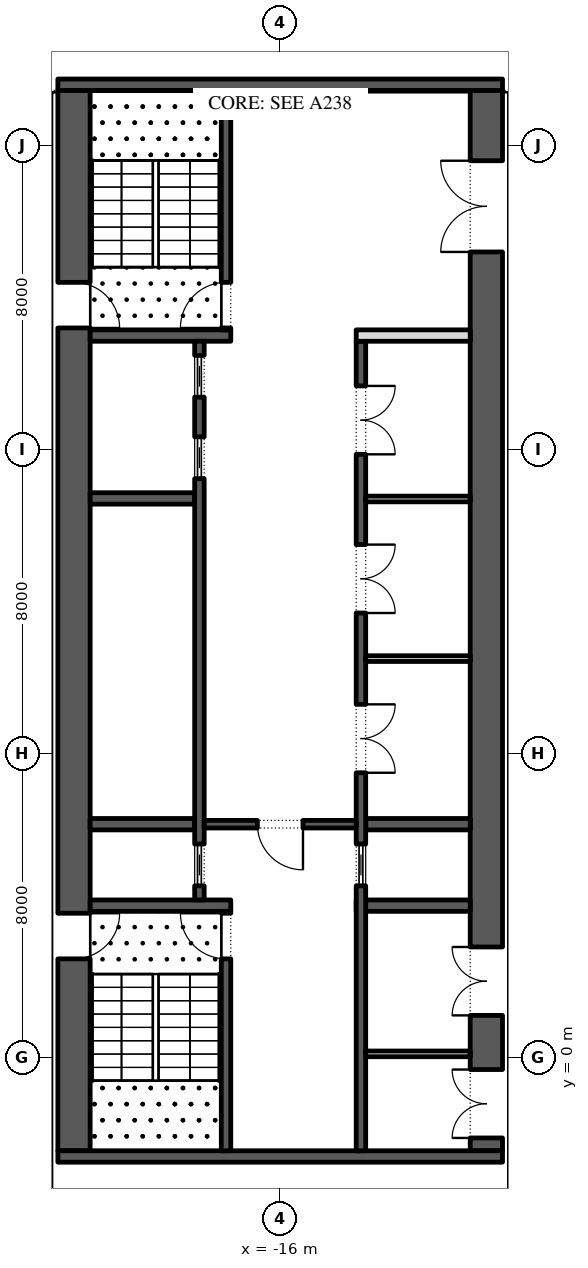
"""IFC4 building model, lengths in metres.
Left out: names, types, materials, properties, quantities, classifications, styles, units other than length and angle.
Written with IfcOpenShell. Run it as: python <this file> out.ifc"""

import sys

from ifc_helpers import new_model, si_unit, direction, frame, frame_2d, origin, place, context, subcontext, project, spatial, rectangle, extrude, element, fill, save


model = new_model("IFC4")
c1 = context("Model", 3, precision=1e-05, world=origin(), true_north=direction((0.0, 1.0)))
c2 = subcontext(c1, "Body", "Model", "MODEL_VIEW")
j1 = project(units=[si_unit("LENGTHUNIT", "METRE"), si_unit("PLANEANGLEUNIT", "RADIAN")], contexts=[c1])
p1 = place(None, origin())
s1 = spatial("IfcSite", under=j1, at=p1, CompositionType="ELEMENT")
p2 = place(p1, origin())
s2 = spatial("IfcBuilding", under=s1, at=p2, CompositionType="ELEMENT")
p3 = place(p2, frame((0.0, 0.0, 160.2)))
s3 = spatial("IfcBuildingStorey", under=s2, at=p3, CompositionType="ELEMENT", Elevation=160.2)
p4 = place(p3, frame((-21.425, -2.45, 0.0), z_axis=(0.0, 0.0, 1.0), x_axis=(0.0, 1.0, 0.0)))
e1 = element("IfcWall", 1, at=p4, inside=s3, PredefinedType="SHEAR", context=c2, shape_type="SweptSolid", body=[
    extrude(rectangle(XDim=27.9, YDim=0.85, at=frame_2d((13.95, 0.0))), origin(), (0.0, 0.0, 1.0), 4.95),
])
p5 = place(p4, frame((5.05, 0.0, 0.0)))
e2 = element("IfcOpeningElement", 2, at=p5, cuts=e1, PredefinedType="OPENING", context=c2, shape_type="SweptSolid", body=[
    extrude(rectangle(XDim=1.2, YDim=2.1, at=frame_2d((0.6, 1.05))), frame((0.0, 0.435, 0.0), z_axis=(0.0, -1.0, 0.0), x_axis=(1.0, 0.0, 0.0)), (0.0, 0.0, 1.0), 0.87),
])
p6 = place(p4, frame((21.65, 0.0, 0.0)))
e3 = element("IfcOpeningElement", 3, at=p6, cuts=e1, PredefinedType="OPENING", context=c2, shape_type="SweptSolid", body=[
    extrude(rectangle(XDim=1.2, YDim=2.1, at=frame_2d((0.6, 1.05))), frame((0.0, 0.435, 0.0), z_axis=(0.0, -1.0, 0.0), x_axis=(1.0, 0.0, 0.0)), (0.0, 0.0, 1.0), 0.87),
])
p7 = place(p3, frame((-10.575, -2.45, 0.0), z_axis=(0.0, 0.0, 1.0), x_axis=(0.0, 1.0, 0.0)))
e4 = element("IfcWall", 4, at=p7, inside=s3, PredefinedType="SHEAR", context=c2, shape_type="SweptSolid", body=[
    extrude(rectangle(XDim=27.9, YDim=0.85, at=frame_2d((13.95, 0.0))), origin(), (0.0, 0.0, 1.0), 4.95),
])
p8 = place(p7, frame((23.65, 0.0, 0.0)))
e5 = element("IfcOpeningElement", 5, at=p8, cuts=e4, PredefinedType="OPENING", context=c2, shape_type="SweptSolid", body=[
    extrude(rectangle(XDim=2.4, YDim=2.1, at=frame_2d((1.2, 1.05))), frame((0.0, 0.435, 0.0), z_axis=(0.0, -1.0, 0.0), x_axis=(1.0, 0.0, 0.0)), (0.0, 0.0, 1.0), 0.87),
])
p9 = place(p7, frame((0.337, 0.0, 0.0)))
e6 = element("IfcOpeningElement", 6, at=p9, cuts=e4, PredefinedType="OPENING", context=c2, shape_type="SweptSolid", body=[
    extrude(rectangle(XDim=1.8, YDim=2.4, at=frame_2d((0.9, 1.2))), frame((0.0, 0.435, 0.0), z_axis=(0.0, -1.0, 0.0), x_axis=(1.0, 0.0, 0.0)), (0.0, 0.0, 1.0), 0.87),
])
p10 = place(p7, frame((3.562, 0.0, 0.0)))
e7 = element("IfcOpeningElement", 7, at=p10, cuts=e4, PredefinedType="OPENING", context=c2, shape_type="SweptSolid", body=[
    extrude(rectangle(XDim=1.8, YDim=2.4, at=frame_2d((0.9, 1.2))), frame((0.0, 0.435, 0.0), z_axis=(0.0, -1.0, 0.0), x_axis=(1.0, 0.0, 0.0)), (0.0, 0.0, 1.0), 0.87),
])
for number, where, z_axis, x_axis in (
    (8, (-21.85, -2.6, 0.0), (0.0, 0.0, 1.0), (1.0, 0.0, 0.0)),
    (9, (-21.85, 25.6, 0.0), (0.0, 0.0, 1.0), (1.0, 0.0, 0.0)),
):
    element("IfcWall", number, at=place(p3, frame(where, z_axis=z_axis, x_axis=x_axis)), inside=s3, PredefinedType="SHEAR", context=c2, shape_type="SweptSolid", body=[
        extrude(rectangle(XDim=11.7, YDim=0.3, at=frame_2d((5.85, 0.0))), origin(), (0.0, 0.0, 1.0), 4.95),
    ])
p11 = place(p3, frame((-21.0, 4.0, 0.0), z_axis=(0.0, 0.0, 1.0), x_axis=(1.0, 0.0, 0.0)))
e10 = element("IfcWall", 10, at=p11, inside=s3, PredefinedType="SHEAR", context=c2, shape_type="SweptSolid", body=[
    extrude(rectangle(XDim=3.7, YDim=0.3, at=frame_2d((1.85, 0.0))), origin(), (0.0, 0.0, 1.0), 4.95),
])
p12 = place(p3, frame((-17.425, -2.45, 0.0), z_axis=(0.0, 0.0, 1.0), x_axis=(0.0, 1.0, 0.0)))
e11 = element("IfcWall", 11, at=p12, inside=s3, PredefinedType="SHEAR", context=c2, shape_type="SweptSolid", body=[
    extrude(rectangle(XDim=6.3, YDim=0.25, at=frame_2d((3.15, 0.0))), origin(), (0.0, 0.0, 1.0), 4.95),
])
p13 = place(p12, frame((5.05, 0.0, 0.0)))
e12 = element("IfcOpeningElement", 12, at=p13, cuts=e11, PredefinedType="OPENING", context=c2, shape_type="SweptSolid", body=[
    extrude(rectangle(XDim=1.2, YDim=2.1, at=frame_2d((0.6, 1.05))), frame((0.0, 0.135, 0.0), z_axis=(0.0, -1.0, 0.0), x_axis=(1.0, 0.0, 0.0)), (0.0, 0.0, 1.0), 0.27),
])
p14 = place(p3, frame((-21.0, 19.0, 0.0), z_axis=(0.0, 0.0, 1.0), x_axis=(1.0, 0.0, 0.0)))
e13 = element("IfcWall", 13, at=p14, inside=s3, PredefinedType="SHEAR", context=c2, shape_type="SweptSolid", body=[
    extrude(rectangle(XDim=3.7, YDim=0.3, at=frame_2d((1.85, 0.0))), origin(), (0.0, 0.0, 1.0), 4.95),
])
p15 = place(p3, frame((-17.425, 19.15, 0.0), z_axis=(0.0, 0.0, 1.0), x_axis=(0.0, 1.0, 0.0)))
e14 = element("IfcWall", 14, at=p15, inside=s3, PredefinedType="SHEAR", context=c2, shape_type="SweptSolid", body=[
    extrude(rectangle(XDim=6.3, YDim=0.25, at=frame_2d((3.15, 0.0))), origin(), (0.0, 0.0, 1.0), 4.95),
])
p16 = place(p15, frame((0.05, 0.0, 0.0)))
e15 = element("IfcOpeningElement", 15, at=p16, cuts=e14, PredefinedType="OPENING", context=c2, shape_type="SweptSolid", body=[
    extrude(rectangle(XDim=1.2, YDim=2.1, at=frame_2d((0.6, 1.05))), frame((0.0, 0.135, 0.0), z_axis=(0.0, -1.0, 0.0), x_axis=(1.0, 0.0, 0.0)), (0.0, 0.0, 1.0), 0.27),
])
for number, where, z_axis, x_axis in (
    (16, (-21.0, 6.143, 0.0), (0.0, 0.0, 1.0), (1.0, 0.0, 0.0)),
    (17, (-21.0, 14.714, 0.0), (0.0, 0.0, 1.0), (1.0, 0.0, 0.0)),
):
    element("IfcWall", number, at=place(p3, frame(where, z_axis=z_axis, x_axis=x_axis)), inside=s3, PredefinedType="SHEAR", context=c2, shape_type="SweptSolid", body=[
        extrude(rectangle(XDim=2.75, YDim=0.3, at=frame_2d((1.375, 0.0))), origin(), (0.0, 0.0, 1.0), 4.95),
    ])
p17 = place(p3, frame((-18.125, 4.15, 0.0), z_axis=(0.0, 0.0, 1.0), x_axis=(0.0, 1.0, 0.0)))
e18 = element("IfcWall", 18, at=p17, inside=s3, PredefinedType="SHEAR", context=c2, shape_type="SweptSolid", body=[
    extrude(rectangle(XDim=14.7, YDim=0.25, at=frame_2d((7.35, 0.0))), origin(), (0.0, 0.0, 1.0), 4.95),
])
p18 = place(p17, frame((0.371, 0.0, 0.0)))
e19 = element("IfcOpeningElement", 19, at=p18, cuts=e18, PredefinedType="OPENING", context=c2, shape_type="SweptSolid", body=[
    extrude(rectangle(XDim=1.1, YDim=2.1, at=frame_2d((0.55, 1.05))), frame((0.0, 0.135, 0.0), z_axis=(0.0, -1.0, 0.0), x_axis=(1.0, 0.0, 0.0)), (0.0, 0.0, 1.0), 0.27),
])
p19 = place(p17, frame((11.086, 0.0, 0.0)))
e20 = element("IfcOpeningElement", 20, at=p19, cuts=e18, PredefinedType="OPENING", context=c2, shape_type="SweptSolid", body=[
    extrude(rectangle(XDim=1.1, YDim=2.1, at=frame_2d((0.55, 1.05))), frame((0.0, 0.135, 0.0), z_axis=(0.0, -1.0, 0.0), x_axis=(1.0, 0.0, 0.0)), (0.0, 0.0, 1.0), 0.27),
])
p20 = place(p17, frame((13.229, 0.0, 0.0)))
e21 = element("IfcOpeningElement", 21, at=p20, cuts=e18, PredefinedType="OPENING", context=c2, shape_type="SweptSolid", body=[
    extrude(rectangle(XDim=1.1, YDim=2.1, at=frame_2d((0.55, 1.05))), frame((0.0, 0.135, 0.0), z_axis=(0.0, -1.0, 0.0), x_axis=(1.0, 0.0, 0.0)), (0.0, 0.0, 1.0), 0.27),
])
p21 = place(p3, frame((-14.0, 4.0, 0.0), z_axis=(0.0, 0.0, 1.0), x_axis=(1.0, 0.0, 0.0)))
e22 = element("IfcWall", 22, at=p21, inside=s3, PredefinedType="SHEAR", context=c2, shape_type="SweptSolid", body=[
    extrude(rectangle(XDim=3.0, YDim=0.3, at=frame_2d((1.5, 0.0))), origin(), (0.0, 0.0, 1.0), 4.95),
])
p22 = place(p3, frame((-13.75, 6.143, 0.0), z_axis=(0.0, 0.0, 1.0), x_axis=(1.0, 0.0, 0.0)))
e23 = element("IfcWall", 23, at=p22, inside=s3, PredefinedType="SHEAR", context=c2, shape_type="SweptSolid", body=[
    extrude(rectangle(XDim=2.75, YDim=0.3, at=frame_2d((1.375, 0.0))), origin(), (0.0, 0.0, 1.0), 4.95),
])
p23 = place(p3, frame((-13.875, -2.45, 0.0), z_axis=(0.0, 0.0, 1.0), x_axis=(0.0, 1.0, 0.0)))
e24 = element("IfcWall", 24, at=p23, inside=s3, PredefinedType="SHEAR", context=c2, shape_type="SweptSolid", body=[
    extrude(rectangle(XDim=21.3, YDim=0.25, at=frame_2d((10.65, 0.0))), origin(), (0.0, 0.0, 1.0), 4.95),
])
p24 = place(p23, frame((9.946, 0.0, 0.0)))
e25 = element("IfcOpeningElement", 25, at=p24, cuts=e24, PredefinedType="OPENING", context=c2, shape_type="SweptSolid", body=[
    extrude(rectangle(XDim=1.8, YDim=2.4, at=frame_2d((0.9, 1.2))), frame((0.0, 0.135, 0.0), z_axis=(0.0, -1.0, 0.0), x_axis=(1.0, 0.0, 0.0)), (0.0, 0.0, 1.0), 0.27),
])
p25 = place(p23, frame((14.15, 0.0, 0.0)))
e26 = element("IfcOpeningElement", 26, at=p25, cuts=e24, PredefinedType="OPENING", context=c2, shape_type="SweptSolid", body=[
    extrude(rectangle(XDim=1.8, YDim=2.4, at=frame_2d((0.9, 1.2))), frame((0.0, 0.135, 0.0), z_axis=(0.0, -1.0, 0.0), x_axis=(1.0, 0.0, 0.0)), (0.0, 0.0, 1.0), 0.27),
])
p26 = place(p23, frame((18.325, 0.0, 0.0)))
e27 = element("IfcOpeningElement", 27, at=p26, cuts=e24, PredefinedType="OPENING", context=c2, shape_type="SweptSolid", body=[
    extrude(rectangle(XDim=1.8, YDim=2.4, at=frame_2d((0.9, 1.2))), frame((0.0, 0.135, 0.0), z_axis=(0.0, -1.0, 0.0), x_axis=(1.0, 0.0, 0.0)), (0.0, 0.0, 1.0), 0.27),
])
p27 = place(p23, frame((6.971, 0.0, 0.0)))
e28 = element("IfcOpeningElement", 28, at=p27, cuts=e24, PredefinedType="OPENING", context=c2, shape_type="SweptSolid", body=[
    extrude(rectangle(XDim=1.1, YDim=2.1, at=frame_2d((0.55, 1.05))), frame((0.0, 0.135, 0.0), z_axis=(0.0, -1.0, 0.0), x_axis=(1.0, 0.0, 0.0)), (0.0, 0.0, 1.0), 0.27),
])
p28 = place(p3, frame((-14.0, 19.0, 0.0), z_axis=(0.0, 0.0, 1.0), x_axis=(1.0, 0.0, 0.0)))
e29 = element("IfcWall", 29, at=p28, inside=s3, PredefinedType="PARTITIONING", context=c2, shape_type="SweptSolid", body=[
    extrude(rectangle(XDim=3.0, YDim=0.3, at=frame_2d((1.5, 0.0))), origin(), (0.0, 0.0, 1.0), 4.95),
])
for number, where, z_axis, x_axis in (
    (30, (-13.75, 10.5, 0.0), (0.0, 0.0, 1.0), (1.0, 0.0, 0.0)),
    (31, (-13.75, 14.7, 0.0), (0.0, 0.0, 1.0), (1.0, 0.0, 0.0)),
):
    element("IfcWall", number, at=place(p3, frame(where, z_axis=z_axis, x_axis=x_axis)), inside=s3, PredefinedType="PARTITIONING", context=c2, shape_type="SweptSolid", body=[
        extrude(rectangle(XDim=2.75, YDim=0.15, at=frame_2d((1.375, 0.0))), origin(), (0.0, 0.0, 1.0), 4.95),
    ])
p29 = place(p3, frame((-18.0, 6.143, 0.0), z_axis=(0.0, 0.0, 1.0), x_axis=(1.0, 0.0, 0.0)))
e32 = element("IfcWall", 32, at=p29, inside=s3, PredefinedType="SHEAR", context=c2, shape_type="SweptSolid", body=[
    extrude(rectangle(XDim=4.0, YDim=0.2, at=frame_2d((2.0, 0.0))), origin(), (0.0, 0.0, 1.0), 4.95),
])
p30 = place(p29, frame((1.4, 0.0, 0.0)))
e33 = element("IfcOpeningElement", 33, at=p30, cuts=e32, PredefinedType="OPENING", context=c2, shape_type="SweptSolid", body=[
    extrude(rectangle(XDim=1.2, YDim=2.1, at=frame_2d((0.6, 1.05))), frame((0.0, 0.11, 0.0), z_axis=(0.0, -1.0, 0.0), x_axis=(1.0, 0.0, 0.0)), (0.0, 0.0, 1.0), 0.22),
])
p31 = place(p3, frame((-13.75, 0.1, 0.0), z_axis=(0.0, 0.0, 1.0), x_axis=(1.0, 0.0, 0.0)))
e34 = element("IfcWall", 34, at=p31, inside=s3, PredefinedType="PARTITIONING", context=c2, shape_type="SweptSolid", body=[
    extrude(rectangle(XDim=2.75, YDim=0.15, at=frame_2d((1.375, 0.0))), origin(), (0.0, 0.0, 1.0), 4.95),
])
p32 = place(p18, origin())
e35 = element("IfcDoor", 35, at=p32, inside=s3, OperationType="SLIDING_TO_LEFT", PredefinedType="DOOR", context=c2, shape_type="SweptSolid", body=[
    extrude(rectangle(XDim=1.1, YDim=2.1, at=frame_2d((0.55, 1.05))), frame((0.0, 0.025, 0.0), z_axis=(0.0, -1.0, 0.0), x_axis=(1.0, 0.0, 0.0)), (0.0, 0.0, 1.0), 0.05),
])
fill(e19, e35)
p33 = place(p19, origin())
e36 = element("IfcDoor", 36, at=p33, inside=s3, OperationType="SLIDING_TO_LEFT", PredefinedType="DOOR", context=c2, shape_type="SweptSolid", body=[
    extrude(rectangle(XDim=1.1, YDim=2.1, at=frame_2d((0.55, 1.05))), frame((0.0, 0.025, 0.0), z_axis=(0.0, -1.0, 0.0), x_axis=(1.0, 0.0, 0.0)), (0.0, 0.0, 1.0), 0.05),
])
fill(e20, e36)
p34 = place(p20, origin())
e37 = element("IfcDoor", 37, at=p34, inside=s3, OperationType="SLIDING_TO_LEFT", PredefinedType="DOOR", context=c2, shape_type="SweptSolid", body=[
    extrude(rectangle(XDim=1.1, YDim=2.1, at=frame_2d((0.55, 1.05))), frame((0.0, 0.025, 0.0), z_axis=(0.0, -1.0, 0.0), x_axis=(1.0, 0.0, 0.0)), (0.0, 0.0, 1.0), 0.05),
])
fill(e21, e37)
p35 = place(p24, frame((1.8, -0.2, 0.0), z_axis=(0.0, 0.0, 1.0), x_axis=(-1.0, 0.0, 0.0)))
e38 = element("IfcDoor", 38, at=p35, inside=s3, OperationType="DOUBLE_DOOR_SINGLE_SWING", PredefinedType="DOOR", context=c2, shape_type="SweptSolid", body=[
    extrude(rectangle(XDim=1.8, YDim=2.4, at=frame_2d((0.9, 1.2))), frame((0.0, -0.075, 0.0), z_axis=(0.0, -1.0, 0.0), x_axis=(1.0, 0.0, 0.0)), (0.0, 0.0, 1.0), 0.05),
])
fill(e25, e38)
p36 = place(p25, frame((1.8, -0.2, 0.0), z_axis=(0.0, 0.0, 1.0), x_axis=(-1.0, 0.0, 0.0)))
e39 = element("IfcDoor", 39, at=p36, inside=s3, OperationType="DOUBLE_DOOR_SINGLE_SWING", PredefinedType="DOOR", context=c2, shape_type="SweptSolid", body=[
    extrude(rectangle(XDim=1.8, YDim=2.4, at=frame_2d((0.9, 1.2))), frame((0.0, -0.075, 0.0), z_axis=(0.0, -1.0, 0.0), x_axis=(1.0, 0.0, 0.0)), (0.0, 0.0, 1.0), 0.05),
])
fill(e26, e39)
p37 = place(p26, frame((1.8, -0.2, 0.0), z_axis=(0.0, 0.0, 1.0), x_axis=(-1.0, 0.0, 0.0)))
e40 = element("IfcDoor", 40, at=p37, inside=s3, OperationType="DOUBLE_DOOR_SINGLE_SWING", PredefinedType="DOOR", context=c2, shape_type="SweptSolid", body=[
    extrude(rectangle(XDim=1.8, YDim=2.4, at=frame_2d((0.9, 1.2))), frame((0.0, -0.075, 0.0), z_axis=(0.0, -1.0, 0.0), x_axis=(1.0, 0.0, 0.0)), (0.0, 0.0, 1.0), 0.05),
])
fill(e27, e40)
p38 = place(p27, origin())
e41 = element("IfcDoor", 41, at=p38, inside=s3, OperationType="SLIDING_TO_LEFT", PredefinedType="DOOR", context=c2, shape_type="SweptSolid", body=[
    extrude(rectangle(XDim=1.1, YDim=2.1, at=frame_2d((0.55, 1.05))), frame((0.0, 0.025, 0.0), z_axis=(0.0, -1.0, 0.0), x_axis=(1.0, 0.0, 0.0)), (0.0, 0.0, 1.0), 0.05),
])
fill(e28, e41)
p39 = place(p30, frame((1.2, 0.0, 0.0), z_axis=(0.0, 0.0, 1.0), x_axis=(-1.0, 0.0, 0.0)))
e42 = element("IfcDoor", 42, at=p39, inside=s3, OperationType="SINGLE_SWING_RIGHT", PredefinedType="DOOR", context=c2, shape_type="SweptSolid", body=[
    extrude(rectangle(XDim=1.2, YDim=2.1, at=frame_2d((0.6, 1.05))), frame((0.0, 0.025, 0.0), z_axis=(0.0, -1.0, 0.0), x_axis=(1.0, 0.0, 0.0)), (0.0, 0.0, 1.0), 0.05),
])
fill(e33, e42)
p40 = place(p8, origin())
e43 = element("IfcDoor", 43, at=p40, inside=s3, OperationType="DOUBLE_DOOR_SINGLE_SWING", PredefinedType="DOOR", context=c2, shape_type="SweptSolid", body=[
    extrude(rectangle(XDim=2.4, YDim=2.1, at=frame_2d((1.2, 1.05))), frame((0.0, 0.025, 0.0), z_axis=(0.0, -1.0, 0.0), x_axis=(1.0, 0.0, 0.0)), (0.0, 0.0, 1.0), 0.05),
])
fill(e5, e43)
p41 = place(p13, origin())
e44 = element("IfcDoor", 44, at=p41, inside=s3, OperationType="SINGLE_SWING_LEFT", PredefinedType="DOOR", context=c2, shape_type="SweptSolid", body=[
    extrude(rectangle(XDim=1.2, YDim=2.1, at=frame_2d((0.6, 1.05))), frame((0.0, 0.025, 0.0), z_axis=(0.0, -1.0, 0.0), x_axis=(1.0, 0.0, 0.0)), (0.0, 0.0, 1.0), 0.05),
])
fill(e12, e44)
p42 = place(p5, frame((1.2, 0.0, 0.0), z_axis=(0.0, 0.0, 1.0), x_axis=(-1.0, 0.0, 0.0)))
e45 = element("IfcDoor", 45, at=p42, inside=s3, OperationType="SINGLE_SWING_RIGHT", PredefinedType="DOOR", context=c2, shape_type="SweptSolid", body=[
    extrude(rectangle(XDim=1.2, YDim=2.1, at=frame_2d((0.6, 1.05))), frame((0.0, 0.025, 0.0), z_axis=(0.0, -1.0, 0.0), x_axis=(1.0, 0.0, 0.0)), (0.0, 0.0, 1.0), 0.05),
])
fill(e2, e45)
p43 = place(p16, origin())
e46 = element("IfcDoor", 46, at=p43, inside=s3, OperationType="SINGLE_SWING_RIGHT", PredefinedType="DOOR", context=c2, shape_type="SweptSolid", body=[
    extrude(rectangle(XDim=1.2, YDim=2.1, at=frame_2d((0.6, 1.05))), frame((0.0, 0.025, 0.0), z_axis=(0.0, -1.0, 0.0), x_axis=(1.0, 0.0, 0.0)), (0.0, 0.0, 1.0), 0.05),
])
fill(e15, e46)
p44 = place(p6, frame((1.2, 0.0, 0.0), z_axis=(0.0, 0.0, 1.0), x_axis=(-1.0, 0.0, 0.0)))
e47 = element("IfcDoor", 47, at=p44, inside=s3, OperationType="SINGLE_SWING_LEFT", PredefinedType="DOOR", context=c2, shape_type="SweptSolid", body=[
    extrude(rectangle(XDim=1.2, YDim=2.1, at=frame_2d((0.6, 1.05))), frame((0.0, 0.025, 0.0), z_axis=(0.0, -1.0, 0.0), x_axis=(1.0, 0.0, 0.0)), (0.0, 0.0, 1.0), 0.05),
])
fill(e3, e47)
p45 = place(p9, origin())
e48 = element("IfcDoor", 48, at=p45, inside=s3, OperationType="DOUBLE_DOOR_SINGLE_SWING", PredefinedType="DOOR", context=c2, shape_type="SweptSolid", body=[
    extrude(rectangle(XDim=1.8, YDim=2.4, at=frame_2d((0.9, 1.2))), frame((0.0, 0.425, 0.0), z_axis=(0.0, -1.0, 0.0), x_axis=(1.0, 0.0, 0.0)), (0.0, 0.0, 1.0), 0.05),
])
fill(e6, e48)
p46 = place(p10, origin())
e49 = element("IfcDoor", 49, at=p46, inside=s3, OperationType="DOUBLE_DOOR_SINGLE_SWING", PredefinedType="DOOR", context=c2, shape_type="SweptSolid", body=[
    extrude(rectangle(XDim=1.8, YDim=2.4, at=frame_2d((0.9, 1.2))), frame((0.0, 0.425, 0.0), z_axis=(0.0, -1.0, 0.0), x_axis=(1.0, 0.0, 0.0)), (0.0, 0.0, 1.0), 0.05),
])
fill(e7, e49)
save(model, sys.argv[1])
